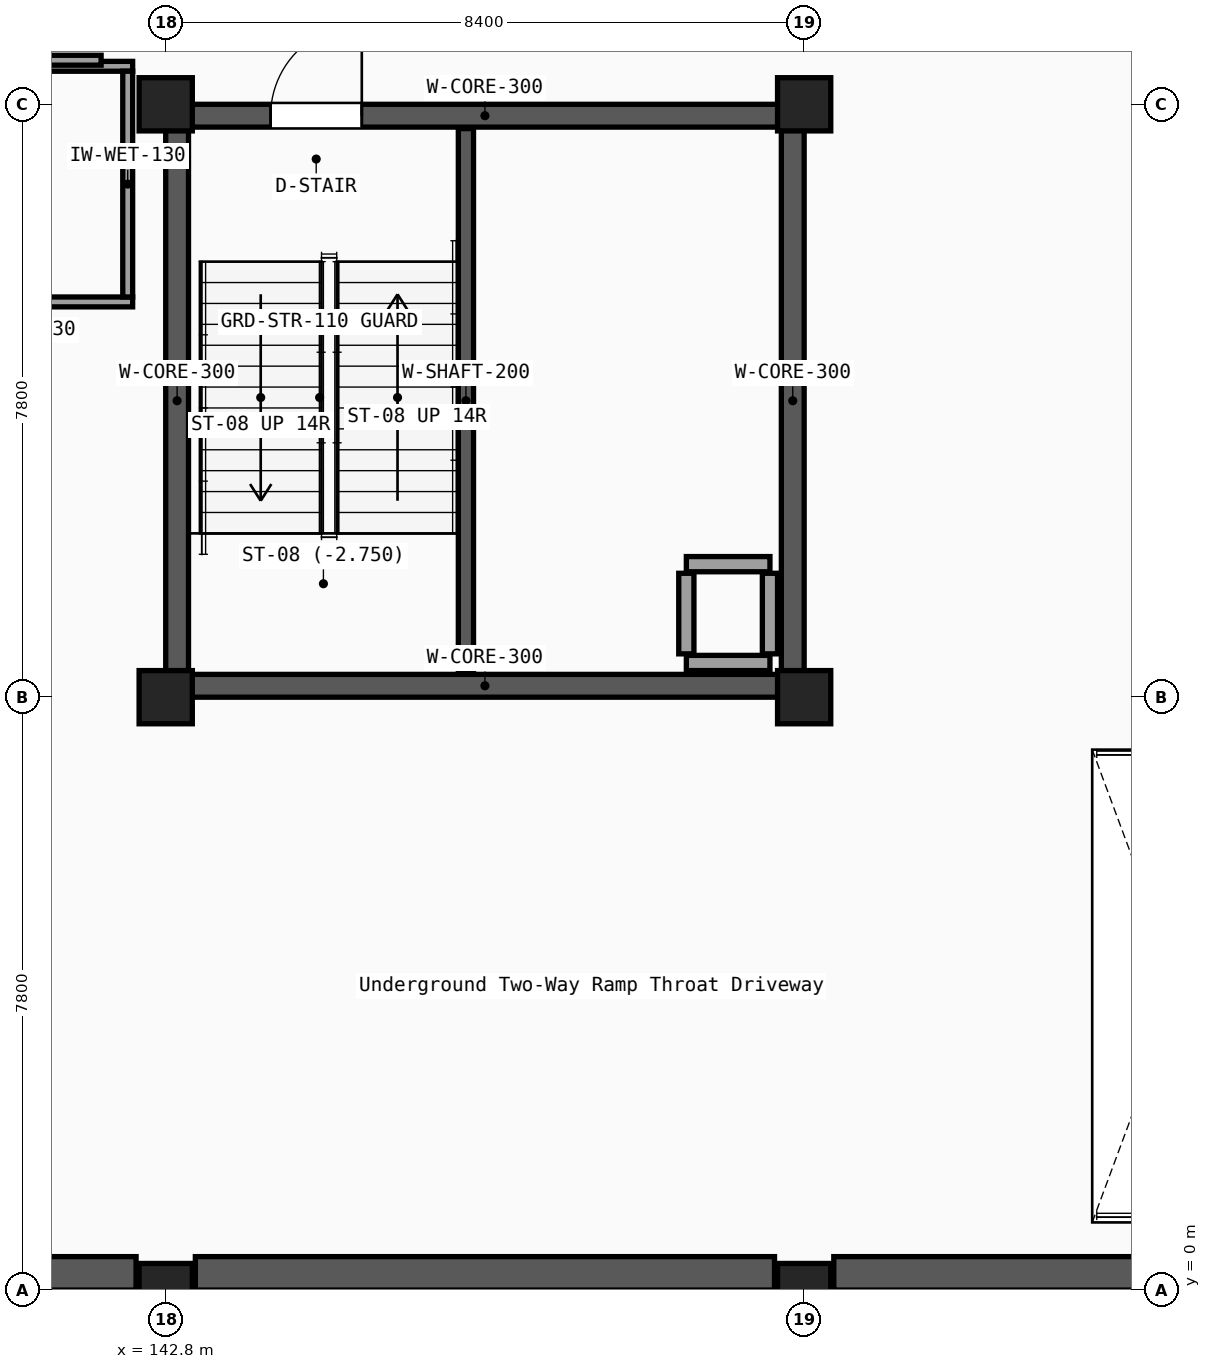
"""IFC4 building model, lengths in metres.
Left out: names, types, materials, properties, quantities, classifications, styles, units other than length and angle.
Written with IfcOpenShell. Run it as: python <this file> out.ifc"""

import sys

from ifc_helpers import new_model, si_unit, direction, frame, frame_2d, origin, origin_2d, place, context, subcontext, project, spatial, rectangle, extrude, element, fill, save


model = new_model("IFC4")
c1 = context("Model", 3, precision=1e-05, world=origin(), true_north=direction((0.0, 1.0)))
c2 = subcontext(c1, "Body", "Model", "MODEL_VIEW")
j1 = project(units=[si_unit("LENGTHUNIT", "METRE"), si_unit("PLANEANGLEUNIT", "RADIAN")], contexts=[c1])
p1 = place(None, origin())
s1 = spatial("IfcSite", under=j1, at=p1, CompositionType="ELEMENT")
p2 = place(p1, origin())
s2 = spatial("IfcBuilding", under=s1, at=p2, CompositionType="ELEMENT")
p3 = place(p2, frame((0.0, 0.0, -5.1)))
s3 = spatial("IfcBuildingStorey", under=s2, at=p3, CompositionType="ELEMENT", Elevation=-5.1)
for number, where, z_axis, x_axis in (
    (1, (142.8, 0.0, -0.22), (0.0, 0.0, 1.0), (1.0, 0.0, 0.0)),
    (2, (142.8, 7.8, -0.22), (0.0, 0.0, 1.0), (1.0, 0.0, 0.0)),
    (3, (142.8, 15.6, -0.22), (0.0, 0.0, 1.0), (1.0, 0.0, 0.0)),
    (4, (151.2, 0.0, -0.22), (0.0, 0.0, 1.0), (1.0, 0.0, 0.0)),
    (5, (151.2, 7.8, -0.22), (0.0, 0.0, 1.0), (1.0, 0.0, 0.0)),
    (6, (151.2, 15.6, -0.22), (0.0, 0.0, 1.0), (1.0, 0.0, 0.0)),
):
    element("IfcColumn", number, at=place(p3, frame(where, z_axis=z_axis, x_axis=x_axis)), inside=s3, PredefinedType="COLUMN", context=c2, shape_type="SweptSolid", body=[
        extrude(rectangle(XDim=0.7, YDim=0.7, at=origin_2d()), origin(), (0.0, 0.0, 1.0), 5.32),
    ])
p4 = place(p3, frame((134.79, 0.22, 0.0), z_axis=(0.0, 0.0, 1.0), x_axis=(1.0, 0.0, 0.0)))
e7 = element("IfcWall", 7, at=p4, inside=s3, PredefinedType="USERDEFINED", context=c2, shape_type="SweptSolid", body=[
    extrude(rectangle(XDim=7.62, YDim=0.44, at=frame_2d((3.81, 0.0))), origin(), (0.0, 0.0, 1.0), 4.45),
])
p5 = place(p3, frame((143.19, 0.22, 0.0), z_axis=(0.0, 0.0, 1.0), x_axis=(1.0, 0.0, 0.0)))
e8 = element("IfcWall", 8, at=p5, inside=s3, PredefinedType="USERDEFINED", context=c2, shape_type="SweptSolid", body=[
    extrude(rectangle(XDim=7.62, YDim=0.44, at=frame_2d((3.81, 0.0))), origin(), (0.0, 0.0, 1.0), 4.45),
])
p6 = place(p3, frame((151.59, 0.22, 0.0), z_axis=(0.0, 0.0, 1.0), x_axis=(1.0, 0.0, 0.0)))
e9 = element("IfcWall", 9, at=p6, inside=s3, PredefinedType="USERDEFINED", context=c2, shape_type="SweptSolid", body=[
    extrude(rectangle(XDim=7.62, YDim=0.44, at=frame_2d((3.81, 0.0))), origin(), (0.0, 0.0, 1.0), 4.45),
])
p7 = place(p3, frame((142.8, 7.95, -0.22), z_axis=(0.0, 0.0, 1.0), x_axis=(1.0, 0.0, 0.0)))
e10 = element("IfcWall", 10, at=p7, inside=s3, PredefinedType="SHEAR", context=c2, shape_type="SweptSolid", body=[
    extrude(rectangle(XDim=8.4, YDim=0.3, at=frame_2d((4.2, 0.0))), origin(), (0.0, 0.0, 1.0), 5.09),
])
p8 = place(p3, frame((142.8, 15.45, -0.22), z_axis=(0.0, 0.0, 1.0), x_axis=(1.0, 0.0, 0.0)))
e11 = element("IfcWall", 11, at=p8, inside=s3, PredefinedType="SHEAR", context=c2, shape_type="SweptSolid", body=[
    extrude(rectangle(XDim=8.4, YDim=0.3, at=frame_2d((4.2, 0.0))), origin(), (0.0, 0.0, 1.0), 5.09),
])
p9 = place(p8, frame((1.38, 0.0, 0.22)))
e12 = element("IfcOpeningElement", 12, at=p9, cuts=e11, PredefinedType="OPENING", context=c2, shape_type="SweptSolid", body=[
    extrude(rectangle(XDim=1.2, YDim=2.15, at=frame_2d((0.6, 1.075))), frame((0.0, 0.16, 0.0), z_axis=(0.0, -1.0, 0.0), x_axis=(1.0, 0.0, 0.0)), (0.0, 0.0, 1.0), 0.32),
])
for number, where, z_axis, x_axis in (
    (13, (142.95, 8.1, -0.22), (0.0, 0.0, 1.0), (0.0, 1.0, 0.0)),
    (14, (151.05, 8.1, -0.22), (0.0, 0.0, 1.0), (0.0, 1.0, 0.0)),
):
    element("IfcWall", number, at=place(p3, frame(where, z_axis=z_axis, x_axis=x_axis)), inside=s3, PredefinedType="SHEAR", context=c2, shape_type="SweptSolid", body=[
        extrude(rectangle(XDim=7.2, YDim=0.3, at=frame_2d((3.6, 0.0))), origin(), (0.0, 0.0, 1.0), 5.09),
    ])
p10 = place(p3, frame((146.75, 8.12, -0.22), z_axis=(0.0, 0.0, 1.0), x_axis=(0.0, 1.0, 0.0)))
e15 = element("IfcWall", 15, at=p10, inside=s3, PredefinedType="SHEAR", context=c2, shape_type="SweptSolid", body=[
    extrude(rectangle(XDim=7.16, YDim=0.2, at=frame_2d((3.58, 0.0))), origin(), (0.0, 0.0, 1.0), 5.09),
])
for number, where, z_axis, x_axis in (
    (16, (149.65, 8.25, 0.0), (0.0, 0.0, 1.0), (1.0, 0.0, 0.0)),
    (17, (149.65, 9.55, 0.0), (0.0, 0.0, 1.0), (1.0, 0.0, 0.0)),
):
    element("IfcWall", number, at=place(p3, frame(where, z_axis=z_axis, x_axis=x_axis)), inside=s3, PredefinedType="PARTITIONING", context=c2, shape_type="SweptSolid", body=[
        extrude(rectangle(XDim=1.1, YDim=0.2, at=frame_2d((0.55, 0.0))), origin(), (0.0, 0.0, 1.0), 4.35),
    ])
for number, where, z_axis, x_axis in (
    (18, (149.65, 8.37, 0.0), (0.0, 0.0, 1.0), (0.0, 1.0, 0.0)),
    (19, (150.75, 8.37, 0.0), (0.0, 0.0, 1.0), (0.0, 1.0, 0.0)),
):
    element("IfcWall", number, at=place(p3, frame(where, z_axis=z_axis, x_axis=x_axis)), inside=s3, PredefinedType="PARTITIONING", context=c2, shape_type="SweptSolid", body=[
        extrude(rectangle(XDim=1.06, YDim=0.2, at=frame_2d((0.53, 0.0))), origin(), (0.0, 0.0, 1.0), 4.35),
    ])
for number, where, z_axis, x_axis in (
    (20, (139.335, 13.0, 0.0), (0.0, 0.0, 1.0), (1.0, 0.0, 0.0)),
    (21, (139.335, 16.1, 0.0), (0.0, 0.0, 1.0), (1.0, 0.0, 0.0)),
):
    element("IfcWall", number, at=place(p3, frame(where, z_axis=z_axis, x_axis=x_axis)), inside=s3, PredefinedType="PARTITIONING", context=c2, shape_type="SweptSolid", body=[
        extrude(rectangle(XDim=3.03, YDim=0.13, at=frame_2d((1.515, 0.0))), origin(), (0.0, 0.0, 1.0), 4.82),
    ])
p11 = place(p3, frame((142.3, 13.065, 0.0), z_axis=(0.0, 0.0, 1.0), x_axis=(0.0, 1.0, 0.0)))
e22 = element("IfcWall", 22, at=p11, inside=s3, PredefinedType="PARTITIONING", context=c2, shape_type="SweptSolid", body=[
    extrude(rectangle(XDim=2.97, YDim=0.13, at=frame_2d((1.485, 0.0))), origin(), (0.0, 0.0, 1.0), 4.35),
])
p12 = place(p3, frame((139.62, 16.18, 0.0), z_axis=(0.0, 0.0, 1.0), x_axis=(1.0, 0.0, 0.0)))
e23 = element("IfcWall", 23, at=p12, inside=s3, PredefinedType="PARTITIONING", context=c2, shape_type="SweptSolid", body=[
    extrude(rectangle(XDim=2.33, YDim=0.13, at=frame_2d((1.165, 0.0))), origin(), (0.0, 0.0, 1.0), 4.82),
])
p13 = place(p9, origin())
e24 = element("IfcDoor", 24, at=p13, inside=s3, OperationType="SINGLE_SWING_RIGHT", PredefinedType="DOOR", context=c2, shape_type="SweptSolid", body=[
    extrude(rectangle(XDim=1.2, YDim=2.15, at=frame_2d((0.6, 1.075))), frame((0.0, 0.025, 0.0), z_axis=(0.0, -1.0, 0.0), x_axis=(1.0, 0.0, 0.0)), (0.0, 0.0, 1.0), 0.05),
])
fill(e12, e24)
save(model, sys.argv[1])
